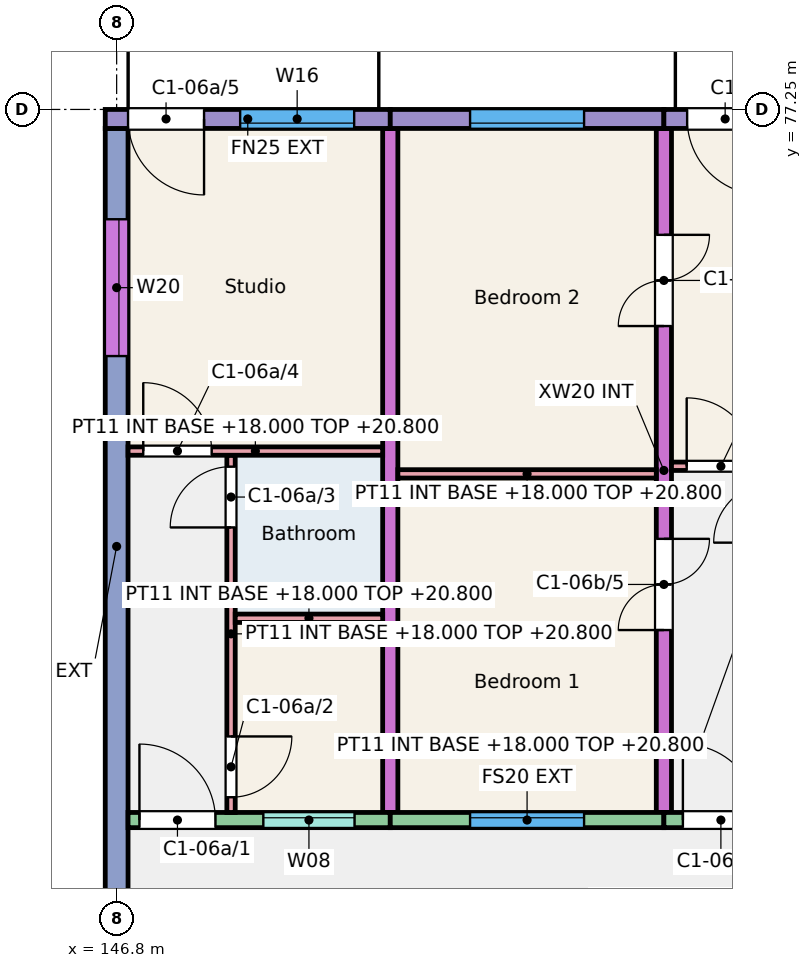
"""IFC4 building model, lengths in metres.
Left out: names, types, materials, properties, quantities, classifications, styles, units other than length and angle.
Written with IfcOpenShell. Run it as: python <this file> out.ifc"""

import sys

from ifc_helpers import new_model, si_unit, direction, frame, frame_2d, origin, place, context, subcontext, project, spatial, rectangle, extrude, element, fill, save


model = new_model("IFC4")
c1 = context("Model", 3, precision=1e-05, world=origin(), true_north=direction((0.0, 1.0)))
c2 = subcontext(c1, "Body", "Model", "MODEL_VIEW")
j1 = project(units=[si_unit("LENGTHUNIT", "METRE"), si_unit("PLANEANGLEUNIT", "RADIAN")], contexts=[c1])
p1 = place(None, origin())
s1 = spatial("IfcSite", under=j1, at=p1, CompositionType="ELEMENT")
p2 = place(p1, origin())
s2 = spatial("IfcBuilding", under=s1, at=p2, CompositionType="ELEMENT")
p3 = place(p2, frame((0.0, 0.0, 18.0)))
s3 = spatial("IfcBuildingStorey", under=s2, at=p3, CompositionType="ELEMENT", Elevation=18.0)
p4 = place(p3, frame((146.8, 66.0, 0.0), z_axis=(0.0, 0.0, 1.0), x_axis=(0.0, 1.0, 0.0)))
e1 = element("IfcWall", 1, at=p4, inside=s3, PredefinedType="SHEAR", context=c2, shape_type="SweptSolid", body=[
    extrude(rectangle(XDim=11.0, YDim=0.3, at=frame_2d((5.5, 0.0))), origin(), (0.0, 0.0, 1.0), 3.0),
])
p5 = place(p4, frame((8.005, 0.0, 0.9)))
e2 = element("IfcOpeningElement", 2, at=p5, cuts=e1, PredefinedType="OPENING", context=c2, shape_type="SweptSolid", body=[
    extrude(rectangle(XDim=1.8, YDim=1.5, at=frame_2d((0.9, 0.75))), frame((0.0, 0.16, 0.0), z_axis=(0.0, -1.0, 0.0), x_axis=(1.0, 0.0, 0.0)), (0.0, 0.0, 1.0), 0.32),
])
p6 = place(p3, frame((150.4, 68.0, 0.0), z_axis=(0.0, 0.0, 1.0), x_axis=(0.0, 1.0, 0.0)))
e3 = element("IfcWall", 3, at=p6, inside=s3, PredefinedType="SHEAR", context=c2, shape_type="SweptSolid", body=[
    extrude(rectangle(XDim=9.0, YDim=0.2, at=frame_2d((4.5, 0.0))), origin(), (0.0, 0.0, 1.0), 3.0),
])
p7 = place(p3, frame((154.0, 68.0, 0.0), z_axis=(0.0, 0.0, 1.0), x_axis=(0.0, 1.0, 0.0)))
e4 = element("IfcWall", 4, at=p7, inside=s3, PredefinedType="SHEAR", context=c2, shape_type="SweptSolid", body=[
    extrude(rectangle(XDim=9.0, YDim=0.2, at=frame_2d((4.5, 0.0))), origin(), (0.0, 0.0, 1.0), 3.0),
])
p8 = place(p7, frame((2.4, 0.0, 0.0)))
e5 = element("IfcOpeningElement", 5, at=p8, cuts=e4, PredefinedType="OPENING", context=c2, shape_type="SweptSolid", body=[
    extrude(rectangle(XDim=1.2, YDim=2.1, at=frame_2d((0.6, 1.05))), frame((0.0, 0.11, 0.0), z_axis=(0.0, -1.0, 0.0), x_axis=(1.0, 0.0, 0.0)), (0.0, 0.0, 1.0), 0.22),
])
p9 = place(p7, frame((6.4, 0.0, 0.0)))
e6 = element("IfcOpeningElement", 6, at=p9, cuts=e4, PredefinedType="OPENING", context=c2, shape_type="SweptSolid", body=[
    extrude(rectangle(XDim=1.2, YDim=2.1, at=frame_2d((0.6, 1.05))), frame((0.0, 0.11, 0.0), z_axis=(0.0, -1.0, 0.0), x_axis=(1.0, 0.0, 0.0)), (0.0, 0.0, 1.0), 0.22),
])
p10 = place(p3, frame((146.65, 77.125, 0.0), z_axis=(0.0, 0.0, 1.0), x_axis=(1.0, 0.0, 0.0)))
e7 = element("IfcWall", 7, at=p10, inside=s3, PredefinedType="SOLIDWALL", context=c2, shape_type="SweptSolid", body=[
    extrude(rectangle(XDim=3.75, YDim=0.25, at=frame_2d((1.875, 0.0))), origin(), (0.0, 0.0, 1.0), 3.0),
])
p11 = place(p10, frame((1.775, 0.0, 0.9)))
e8 = element("IfcOpeningElement", 8, at=p11, cuts=e7, PredefinedType="OPENING", context=c2, shape_type="SweptSolid", body=[
    extrude(rectangle(XDim=1.5, YDim=1.5, at=frame_2d((0.75, 0.75))), frame((0.0, 0.135, 0.0), z_axis=(0.0, -1.0, 0.0), x_axis=(1.0, 0.0, 0.0)), (0.0, 0.0, 1.0), 0.27),
])
p12 = place(p10, frame((0.3, 0.0, 0.0)))
e9 = element("IfcOpeningElement", 9, at=p12, cuts=e7, PredefinedType="OPENING", context=c2, shape_type="SweptSolid", body=[
    extrude(rectangle(XDim=1.0, YDim=2.1, at=frame_2d((0.5, 1.05))), frame((0.0, 0.135, 0.0), z_axis=(0.0, -1.0, 0.0), x_axis=(1.0, 0.0, 0.0)), (0.0, 0.0, 1.0), 0.27),
])
p13 = place(p3, frame((146.95, 67.9, 0.0), z_axis=(0.0, 0.0, 1.0), x_axis=(1.0, 0.0, 0.0)))
e10 = element("IfcWall", 10, at=p13, inside=s3, PredefinedType="SOLIDWALL", context=c2, shape_type="SweptSolid", body=[
    extrude(rectangle(XDim=3.45, YDim=0.2, at=frame_2d((1.725, 0.0))), origin(), (0.0, 0.0, 1.0), 3.0),
])
p14 = place(p13, frame((1.78, 0.0, 1.1)))
e11 = element("IfcOpeningElement", 11, at=p14, cuts=e10, PredefinedType="OPENING", context=c2, shape_type="SweptSolid", body=[
    extrude(rectangle(XDim=1.2, YDim=1.3, at=frame_2d((0.6, 0.65))), frame((0.0, 0.11, 0.0), z_axis=(0.0, -1.0, 0.0), x_axis=(1.0, 0.0, 0.0)), (0.0, 0.0, 1.0), 0.22),
])
p15 = place(p13, frame((0.15, 0.0, 0.0)))
e12 = element("IfcOpeningElement", 12, at=p15, cuts=e10, PredefinedType="OPENING", context=c2, shape_type="SweptSolid", body=[
    extrude(rectangle(XDim=1.0, YDim=2.1, at=frame_2d((0.5, 1.05))), frame((0.0, 0.11, 0.0), z_axis=(0.0, -1.0, 0.0), x_axis=(1.0, 0.0, 0.0)), (0.0, 0.0, 1.0), 0.22),
])
p16 = place(p3, frame((150.4, 77.125, 0.0), z_axis=(0.0, 0.0, 1.0), x_axis=(1.0, 0.0, 0.0)))
e13 = element("IfcWall", 13, at=p16, inside=s3, PredefinedType="SOLIDWALL", context=c2, shape_type="SweptSolid", body=[
    extrude(rectangle(XDim=3.6, YDim=0.25, at=frame_2d((1.8, 0.0))), origin(), (0.0, 0.0, 1.0), 3.0),
])
p17 = place(p16, frame((1.05, 0.0, 0.9)))
e14 = element("IfcOpeningElement", 14, at=p17, cuts=e13, PredefinedType="OPENING", context=c2, shape_type="SweptSolid", body=[
    extrude(rectangle(XDim=1.5, YDim=1.5, at=frame_2d((0.75, 0.75))), frame((0.0, 0.135, 0.0), z_axis=(0.0, -1.0, 0.0), x_axis=(1.0, 0.0, 0.0)), (0.0, 0.0, 1.0), 0.27),
])
p18 = place(p3, frame((150.4, 67.9, 0.0), z_axis=(0.0, 0.0, 1.0), x_axis=(1.0, 0.0, 0.0)))
e15 = element("IfcWall", 15, at=p18, inside=s3, PredefinedType="SOLIDWALL", context=c2, shape_type="SweptSolid", body=[
    extrude(rectangle(XDim=3.6, YDim=0.2, at=frame_2d((1.8, 0.0))), origin(), (0.0, 0.0, 1.0), 3.0),
])
p19 = place(p18, frame((1.05, 0.0, 0.9)))
e16 = element("IfcOpeningElement", 16, at=p19, cuts=e15, PredefinedType="OPENING", context=c2, shape_type="SweptSolid", body=[
    extrude(rectangle(XDim=1.5, YDim=1.5, at=frame_2d((0.75, 0.75))), frame((0.0, 0.11, 0.0), z_axis=(0.0, -1.0, 0.0), x_axis=(1.0, 0.0, 0.0)), (0.0, 0.0, 1.0), 0.22),
])
p20 = place(p3, frame((154.0, 77.125, 0.0), z_axis=(0.0, 0.0, 1.0), x_axis=(1.0, 0.0, 0.0)))
e17 = element("IfcWall", 17, at=p20, inside=s3, PredefinedType="SOLIDWALL", context=c2, shape_type="SweptSolid", body=[
    extrude(rectangle(XDim=3.6, YDim=0.25, at=frame_2d((1.8, 0.0))), origin(), (0.0, 0.0, 1.0), 3.0),
])
p21 = place(p20, frame((1.69, 0.0, 0.9)))
e18 = element("IfcOpeningElement", 18, at=p21, cuts=e17, PredefinedType="OPENING", context=c2, shape_type="SweptSolid", body=[
    extrude(rectangle(XDim=1.5, YDim=1.5, at=frame_2d((0.75, 0.75))), frame((0.0, 0.135, 0.0), z_axis=(0.0, -1.0, 0.0), x_axis=(1.0, 0.0, 0.0)), (0.0, 0.0, 1.0), 0.27),
])
p22 = place(p20, frame((0.306, 0.0, 0.0)))
e19 = element("IfcOpeningElement", 19, at=p22, cuts=e17, PredefinedType="OPENING", context=c2, shape_type="SweptSolid", body=[
    extrude(rectangle(XDim=1.0, YDim=2.1, at=frame_2d((0.5, 1.05))), frame((0.0, 0.135, 0.0), z_axis=(0.0, -1.0, 0.0), x_axis=(1.0, 0.0, 0.0)), (0.0, 0.0, 1.0), 0.27),
])
p23 = place(p3, frame((154.0, 67.9, 0.0), z_axis=(0.0, 0.0, 1.0), x_axis=(1.0, 0.0, 0.0)))
e20 = element("IfcWall", 20, at=p23, inside=s3, PredefinedType="SOLIDWALL", context=c2, shape_type="SweptSolid", body=[
    extrude(rectangle(XDim=3.6, YDim=0.2, at=frame_2d((1.8, 0.0))), origin(), (0.0, 0.0, 1.0), 3.0),
])
p24 = place(p23, frame((1.893, 0.0, 1.1)))
e21 = element("IfcOpeningElement", 21, at=p24, cuts=e20, PredefinedType="OPENING", context=c2, shape_type="SweptSolid", body=[
    extrude(rectangle(XDim=1.2, YDim=1.3, at=frame_2d((0.6, 0.65))), frame((0.0, 0.11, 0.0), z_axis=(0.0, -1.0, 0.0), x_axis=(1.0, 0.0, 0.0)), (0.0, 0.0, 1.0), 0.22),
])
p25 = place(p23, frame((0.25, 0.0, 0.0)))
e22 = element("IfcOpeningElement", 22, at=p25, cuts=e20, PredefinedType="OPENING", context=c2, shape_type="SweptSolid", body=[
    extrude(rectangle(XDim=1.0, YDim=2.1, at=frame_2d((0.5, 1.05))), frame((0.0, 0.11, 0.0), z_axis=(0.0, -1.0, 0.0), x_axis=(1.0, 0.0, 0.0)), (0.0, 0.0, 1.0), 0.22),
])
p26 = place(p3, frame((148.305, 68.0, 0.0), z_axis=(0.0, 0.0, 1.0), x_axis=(0.0, 1.0, 0.0)))
e23 = element("IfcWall", 23, at=p26, inside=s3, PredefinedType="PARTITIONING", context=c2, shape_type="SweptSolid", body=[
    extrude(rectangle(XDim=4.7, YDim=0.11, at=frame_2d((2.35, 0.0))), origin(), (0.0, 0.0, 1.0), 2.8),
])
p27 = place(p26, frame((0.2, 0.0, 0.0)))
e24 = element("IfcOpeningElement", 24, at=p27, cuts=e23, PredefinedType="OPENING", context=c2, shape_type="SweptSolid", body=[
    extrude(rectangle(XDim=0.8, YDim=2.1, at=frame_2d((0.4, 1.05))), frame((0.0, 0.065, 0.0), z_axis=(0.0, -1.0, 0.0), x_axis=(1.0, 0.0, 0.0)), (0.0, 0.0, 1.0), 0.13),
])
p28 = place(p26, frame((3.75, 0.0, 0.0)))
e25 = element("IfcOpeningElement", 25, at=p28, cuts=e23, PredefinedType="OPENING", context=c2, shape_type="SweptSolid", body=[
    extrude(rectangle(XDim=0.8, YDim=2.1, at=frame_2d((0.4, 1.05))), frame((0.0, 0.065, 0.0), z_axis=(0.0, -1.0, 0.0), x_axis=(1.0, 0.0, 0.0)), (0.0, 0.0, 1.0), 0.13),
])
p29 = place(p3, frame((148.36, 70.555, 0.0), z_axis=(0.0, 0.0, 1.0), x_axis=(1.0, 0.0, 0.0)))
e26 = element("IfcWall", 26, at=p29, inside=s3, PredefinedType="PARTITIONING", context=c2, shape_type="SweptSolid", body=[
    extrude(rectangle(XDim=1.94, YDim=0.11, at=frame_2d((0.97, 0.0))), origin(), (0.0, 0.0, 1.0), 2.8),
])
p30 = place(p3, frame((146.95, 72.755, 0.0), z_axis=(0.0, 0.0, 1.0), x_axis=(1.0, 0.0, 0.0)))
e27 = element("IfcWall", 27, at=p30, inside=s3, PredefinedType="PARTITIONING", context=c2, shape_type="SweptSolid", body=[
    extrude(rectangle(XDim=3.35, YDim=0.11, at=frame_2d((1.675, 0.0))), origin(), (0.0, 0.0, 1.0), 2.8),
])
p31 = place(p30, frame((0.2, 0.0, 0.0)))
e28 = element("IfcOpeningElement", 28, at=p31, cuts=e27, PredefinedType="OPENING", context=c2, shape_type="SweptSolid", body=[
    extrude(rectangle(XDim=0.9, YDim=2.1, at=frame_2d((0.45, 1.05))), frame((0.0, 0.065, 0.0), z_axis=(0.0, -1.0, 0.0), x_axis=(1.0, 0.0, 0.0)), (0.0, 0.0, 1.0), 0.13),
])
p32 = place(p3, frame((154.1, 72.555, 0.0), z_axis=(0.0, 0.0, 1.0), x_axis=(1.0, 0.0, 0.0)))
e29 = element("IfcWall", 29, at=p32, inside=s3, PredefinedType="PARTITIONING", context=c2, shape_type="SweptSolid", body=[
    extrude(rectangle(XDim=3.375, YDim=0.11, at=frame_2d((1.688, 0.0))), origin(), (0.0, 0.0, 1.0), 2.8),
])
p33 = place(p32, frame((0.2, 0.0, 0.0)))
e30 = element("IfcOpeningElement", 30, at=p33, cuts=e29, PredefinedType="OPENING", context=c2, shape_type="SweptSolid", body=[
    extrude(rectangle(XDim=0.9, YDim=2.1, at=frame_2d((0.45, 1.05))), frame((0.0, 0.065, 0.0), z_axis=(0.0, -1.0, 0.0), x_axis=(1.0, 0.0, 0.0)), (0.0, 0.0, 1.0), 0.13),
])
p34 = place(p3, frame((150.5, 72.455, 0.0), z_axis=(0.0, 0.0, 1.0), x_axis=(1.0, 0.0, 0.0)))
e31 = element("IfcWall", 31, at=p34, inside=s3, PredefinedType="PARTITIONING", context=c2, shape_type="SweptSolid", body=[
    extrude(rectangle(XDim=3.4, YDim=0.11, at=frame_2d((1.7, 0.0))), origin(), (0.0, 0.0, 1.0), 2.8),
])
p35 = place(p14, origin())
e32 = element("IfcWindow", 32, at=p35, inside=s3, PartitioningType="SINGLE_PANEL", PredefinedType="WINDOW", context=c2, shape_type="SweptSolid", body=[
    extrude(rectangle(XDim=1.2, YDim=1.3, at=frame_2d((0.6, 0.65))), frame((0.0, 0.06, 0.0), z_axis=(0.0, -1.0, 0.0), x_axis=(1.0, 0.0, 0.0)), (0.0, 0.0, 1.0), 0.06),
])
fill(e11, e32)
p36 = place(p11, origin())
e33 = element("IfcWindow", 33, at=p36, inside=s3, PartitioningType="SINGLE_PANEL", PredefinedType="WINDOW", context=c2, shape_type="SweptSolid", body=[
    extrude(rectangle(XDim=1.5, YDim=1.5, at=frame_2d((0.75, 0.75))), frame((0.0, -0.025, 0.0), z_axis=(0.0, -1.0, 0.0), x_axis=(1.0, 0.0, 0.0)), (0.0, 0.0, 1.0), 0.06),
])
fill(e8, e33)
p37 = place(p5, origin())
e34 = element("IfcWindow", 34, at=p37, inside=s3, PartitioningType="SINGLE_PANEL", PredefinedType="WINDOW", context=c2, shape_type="SweptSolid", body=[
    extrude(rectangle(XDim=1.8, YDim=1.5, at=frame_2d((0.9, 0.75))), frame((0.0, 0.0, 0.0), z_axis=(0.0, -1.0, 0.0), x_axis=(1.0, 0.0, 0.0)), (0.0, 0.0, 1.0), 0.06),
])
fill(e2, e34)
p38 = place(p19, origin())
e35 = element("IfcWindow", 35, at=p38, inside=s3, PartitioningType="SINGLE_PANEL", PredefinedType="WINDOW", context=c2, shape_type="SweptSolid", body=[
    extrude(rectangle(XDim=1.5, YDim=1.5, at=frame_2d((0.75, 0.75))), frame((0.0, 0.06, 0.0), z_axis=(0.0, -1.0, 0.0), x_axis=(1.0, 0.0, 0.0)), (0.0, 0.0, 1.0), 0.06),
])
fill(e16, e35)
p39 = place(p17, origin())
e36 = element("IfcWindow", 36, at=p39, inside=s3, PartitioningType="SINGLE_PANEL", PredefinedType="WINDOW", context=c2, shape_type="SweptSolid", body=[
    extrude(rectangle(XDim=1.5, YDim=1.5, at=frame_2d((0.75, 0.75))), frame((0.0, -0.025, 0.0), z_axis=(0.0, -1.0, 0.0), x_axis=(1.0, 0.0, 0.0)), (0.0, 0.0, 1.0), 0.06),
])
fill(e14, e36)
p40 = place(p15, origin())
e37 = element("IfcDoor", 37, at=p40, inside=s3, OperationType="SINGLE_SWING_LEFT", PredefinedType="DOOR", context=c2, shape_type="SweptSolid", body=[
    extrude(rectangle(XDim=1.0, YDim=2.1, at=frame_2d((0.5, 1.05))), frame((0.0, 0.025, 0.0), z_axis=(0.0, -1.0, 0.0), x_axis=(1.0, 0.0, 0.0)), (0.0, 0.0, 1.0), 0.05),
])
fill(e12, e37)
p41 = place(p27, origin())
e38 = element("IfcDoor", 38, at=p41, inside=s3, OperationType="SINGLE_SWING_RIGHT", PredefinedType="DOOR", context=c2, shape_type="SweptSolid", body=[
    extrude(rectangle(XDim=0.8, YDim=2.1, at=frame_2d((0.4, 1.05))), frame((0.0, 0.025, 0.0), z_axis=(0.0, -1.0, 0.0), x_axis=(1.0, 0.0, 0.0)), (0.0, 0.0, 1.0), 0.05),
])
fill(e24, e38)
p42 = place(p28, origin())
e39 = element("IfcDoor", 39, at=p42, inside=s3, OperationType="SINGLE_SWING_LEFT", PredefinedType="DOOR", context=c2, shape_type="SweptSolid", body=[
    extrude(rectangle(XDim=0.8, YDim=2.1, at=frame_2d((0.4, 1.05))), frame((0.0, 0.025, 0.0), z_axis=(0.0, -1.0, 0.0), x_axis=(1.0, 0.0, 0.0)), (0.0, 0.0, 1.0), 0.05),
])
fill(e25, e39)
p43 = place(p31, origin())
e40 = element("IfcDoor", 40, at=p43, inside=s3, OperationType="SINGLE_SWING_LEFT", PredefinedType="DOOR", context=c2, shape_type="SweptSolid", body=[
    extrude(rectangle(XDim=0.9, YDim=2.1, at=frame_2d((0.45, 1.05))), frame((0.0, 0.025, 0.0), z_axis=(0.0, -1.0, 0.0), x_axis=(1.0, 0.0, 0.0)), (0.0, 0.0, 1.0), 0.05),
])
fill(e28, e40)
p44 = place(p12, origin())
e41 = element("IfcDoor", 41, at=p44, inside=s3, OperationType="SINGLE_SWING_RIGHT", PredefinedType="DOOR", context=c2, shape_type="SweptSolid", body=[
    extrude(rectangle(XDim=1.0, YDim=2.1, at=frame_2d((0.5, 1.05))), frame((0.0, 0.025, 0.0), z_axis=(0.0, -1.0, 0.0), x_axis=(1.0, 0.0, 0.0)), (0.0, 0.0, 1.0), 0.05),
])
fill(e9, e41)
p45 = place(p25, origin())
e42 = element("IfcDoor", 42, at=p45, inside=s3, OperationType="SINGLE_SWING_LEFT", PredefinedType="DOOR", context=c2, shape_type="SweptSolid", body=[
    extrude(rectangle(XDim=1.0, YDim=2.1, at=frame_2d((0.5, 1.05))), frame((0.0, 0.025, 0.0), z_axis=(0.0, -1.0, 0.0), x_axis=(1.0, 0.0, 0.0)), (0.0, 0.0, 1.0), 0.05),
])
fill(e22, e42)
p46 = place(p33, origin())
e43 = element("IfcDoor", 43, at=p46, inside=s3, OperationType="SINGLE_SWING_LEFT", PredefinedType="DOOR", context=c2, shape_type="SweptSolid", body=[
    extrude(rectangle(XDim=0.9, YDim=2.1, at=frame_2d((0.45, 1.05))), frame((0.0, 0.025, 0.0), z_axis=(0.0, -1.0, 0.0), x_axis=(1.0, 0.0, 0.0)), (0.0, 0.0, 1.0), 0.05),
])
fill(e30, e43)
p47 = place(p8, origin())
e44 = element("IfcDoor", 44, at=p47, inside=s3, OperationType="DOUBLE_DOOR_SINGLE_SWING", PredefinedType="DOOR", context=c2, shape_type="SweptSolid", body=[
    extrude(rectangle(XDim=1.2, YDim=2.1, at=frame_2d((0.6, 1.05))), frame((0.0, 0.025, 0.0), z_axis=(0.0, -1.0, 0.0), x_axis=(1.0, 0.0, 0.0)), (0.0, 0.0, 1.0), 0.05),
])
fill(e5, e44)
p48 = place(p9, origin())
e45 = element("IfcDoor", 45, at=p48, inside=s3, OperationType="DOUBLE_DOOR_SINGLE_SWING", PredefinedType="DOOR", context=c2, shape_type="SweptSolid", body=[
    extrude(rectangle(XDim=1.2, YDim=2.1, at=frame_2d((0.6, 1.05))), frame((0.0, 0.025, 0.0), z_axis=(0.0, -1.0, 0.0), x_axis=(1.0, 0.0, 0.0)), (0.0, 0.0, 1.0), 0.05),
])
fill(e6, e45)
p49 = place(p22, origin())
e46 = element("IfcDoor", 46, at=p49, inside=s3, OperationType="SINGLE_SWING_RIGHT", PredefinedType="DOOR", context=c2, shape_type="SweptSolid", body=[
    extrude(rectangle(XDim=1.0, YDim=2.1, at=frame_2d((0.5, 1.05))), frame((0.0, 0.025, 0.0), z_axis=(0.0, -1.0, 0.0), x_axis=(1.0, 0.0, 0.0)), (0.0, 0.0, 1.0), 0.05),
])
fill(e19, e46)
save(model, sys.argv[1])
